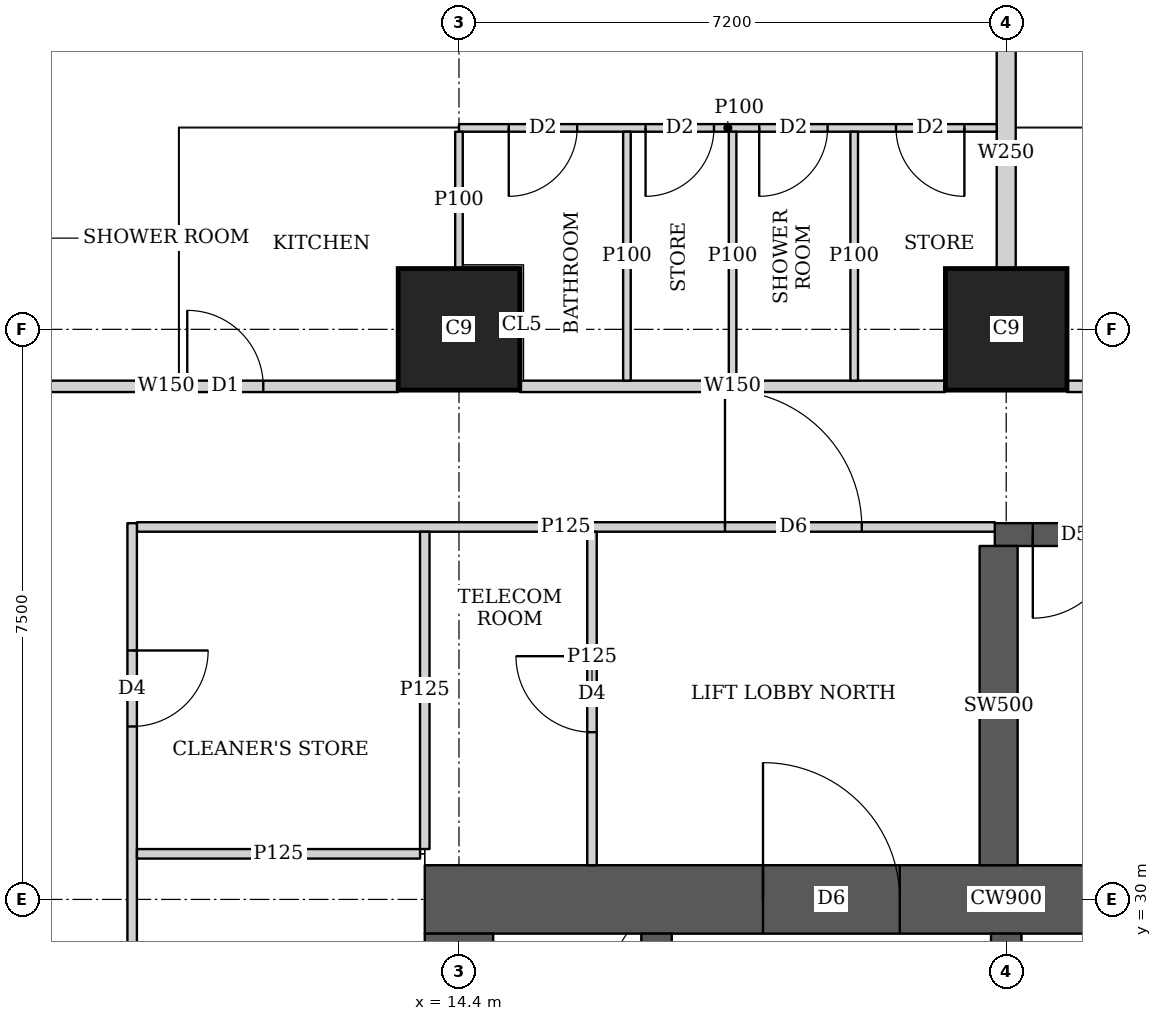
"""IFC4 building model, lengths in metres.
Left out: names, types, materials, properties, quantities, classifications, styles, units other than length and angle.
Written with IfcOpenShell. Run it as: python <this file> out.ifc"""

import sys

from ifc_helpers import new_model, si_unit, direction, frame, frame_2d, origin, origin_2d, place, context, subcontext, project, spatial, rectangle, extrude, element, fill, save


model = new_model("IFC4")
c1 = context("Model", 3, precision=1e-05, world=origin(), true_north=direction((0.0, 1.0)))
c2 = subcontext(c1, "Body", "Model", "MODEL_VIEW")
j1 = project(units=[si_unit("LENGTHUNIT", "METRE"), si_unit("PLANEANGLEUNIT", "RADIAN")], contexts=[c1])
p1 = place(None, origin())
s1 = spatial("IfcSite", under=j1, at=p1, CompositionType="ELEMENT")
p2 = place(p1, origin())
s2 = spatial("IfcBuilding", under=s1, at=p2, CompositionType="ELEMENT")
p3 = place(p2, frame((0.0, 0.0, 126.65)))
s3 = spatial("IfcBuildingStorey", under=s2, at=p3, CompositionType="ELEMENT", Elevation=126.65)
for number, where, z_axis, x_axis in (
    (1, (14.4, 37.5, 0.0), (0.0, 0.0, 1.0), (1.0, 0.0, 0.0)),
    (2, (21.6, 37.5, 0.0), (0.0, 0.0, 1.0), (1.0, 0.0, 0.0)),
):
    element("IfcColumn", number, at=place(p3, frame(where, z_axis=z_axis, x_axis=x_axis)), inside=s3, PredefinedType="COLUMN", context=c2, shape_type="SweptSolid", body=[
        extrude(rectangle(XDim=1.6, YDim=1.6, at=origin_2d()), origin(), (0.0, 0.0, 1.0), 3.75),
    ])
p4 = place(p3, frame((13.95, 30.0, 0.0), z_axis=(0.0, 0.0, 1.0), x_axis=(1.0, 0.0, 0.0)))
e3 = element("IfcWall", 3, at=p4, inside=s3, PredefinedType="SHEAR", context=c2, shape_type="SweptSolid", body=[
    extrude(rectangle(XDim=15.3, YDim=0.9, at=frame_2d((7.65, 0.0))), origin(), (0.0, 0.0, 1.0), 3.75),
])
p5 = place(p4, frame((4.45, 0.0, 0.0)))
e4 = element("IfcOpeningElement", 4, at=p5, cuts=e3, PredefinedType="OPENING", context=c2, shape_type="SweptSolid", body=[
    extrude(rectangle(XDim=1.8, YDim=2.1, at=frame_2d((0.9, 1.05))), frame((0.0, 0.46, 0.0), z_axis=(0.0, -1.0, 0.0), x_axis=(1.0, 0.0, 0.0)), (0.0, 0.0, 1.0), 0.92),
])
p6 = place(p4, frame((10.7, 0.0, 0.0)))
e5 = element("IfcOpeningElement", 5, at=p6, cuts=e3, PredefinedType="OPENING", context=c2, shape_type="SweptSolid", body=[
    extrude(rectangle(XDim=1.1, YDim=2.1, at=frame_2d((0.55, 1.05))), frame((0.0, 0.46, 0.0), z_axis=(0.0, -1.0, 0.0), x_axis=(1.0, 0.0, 0.0)), (0.0, 0.0, 1.0), 0.92),
])
p7 = place(p3, frame((14.4, 15.45, 0.0), z_axis=(0.0, 0.0, 1.0), x_axis=(0.0, 1.0, 0.0)))
e6 = element("IfcWall", 6, at=p7, inside=s3, PredefinedType="SHEAR", context=c2, shape_type="SweptSolid", body=[
    extrude(rectangle(XDim=14.1, YDim=0.9, at=frame_2d((7.05, 0.0))), origin(), (0.0, 0.0, 1.0), 3.75),
])
p8 = place(p3, frame((17.0, 15.45, 0.0), z_axis=(0.0, 0.0, 1.0), x_axis=(0.0, 1.0, 0.0)))
e7 = element("IfcWall", 7, at=p8, inside=s3, PredefinedType="SHEAR", context=c2, shape_type="SweptSolid", body=[
    extrude(rectangle(XDim=14.1, YDim=0.4, at=frame_2d((7.05, 0.0))), origin(), (0.0, 0.0, 1.0), 3.75),
])
p9 = place(p8, frame((0.875, 0.0, 0.0)))
e8 = element("IfcOpeningElement", 8, at=p9, cuts=e7, PredefinedType="OPENING", context=c2, shape_type="SweptSolid", body=[
    extrude(rectangle(XDim=1.1, YDim=2.1, at=frame_2d((0.55, 1.05))), frame((0.0, 0.21, 0.0), z_axis=(0.0, -1.0, 0.0), x_axis=(1.0, 0.0, 0.0)), (0.0, 0.0, 1.0), 0.42),
])
p10 = place(p8, frame((4.625, 0.0, 0.0)))
e9 = element("IfcOpeningElement", 9, at=p10, cuts=e7, PredefinedType="OPENING", context=c2, shape_type="SweptSolid", body=[
    extrude(rectangle(XDim=1.1, YDim=2.1, at=frame_2d((0.55, 1.05))), frame((0.0, 0.21, 0.0), z_axis=(0.0, -1.0, 0.0), x_axis=(1.0, 0.0, 0.0)), (0.0, 0.0, 1.0), 0.42),
])
p11 = place(p8, frame((8.375, 0.0, 0.0)))
e10 = element("IfcOpeningElement", 10, at=p11, cuts=e7, PredefinedType="OPENING", context=c2, shape_type="SweptSolid", body=[
    extrude(rectangle(XDim=1.1, YDim=2.1, at=frame_2d((0.55, 1.05))), frame((0.0, 0.21, 0.0), z_axis=(0.0, -1.0, 0.0), x_axis=(1.0, 0.0, 0.0)), (0.0, 0.0, 1.0), 0.42),
])
p12 = place(p8, frame((12.125, 0.0, 0.0)))
e11 = element("IfcOpeningElement", 11, at=p12, cuts=e7, PredefinedType="OPENING", context=c2, shape_type="SweptSolid", body=[
    extrude(rectangle(XDim=1.1, YDim=2.1, at=frame_2d((0.55, 1.05))), frame((0.0, 0.21, 0.0), z_axis=(0.0, -1.0, 0.0), x_axis=(1.0, 0.0, 0.0)), (0.0, 0.0, 1.0), 0.42),
])
p13 = place(p3, frame((21.6, 15.45, 0.0), z_axis=(0.0, 0.0, 1.0), x_axis=(0.0, 1.0, 0.0)))
e12 = element("IfcWall", 12, at=p13, inside=s3, PredefinedType="SHEAR", context=c2, shape_type="SweptSolid", body=[
    extrude(rectangle(XDim=14.1, YDim=0.4, at=frame_2d((7.05, 0.0))), origin(), (0.0, 0.0, 1.0), 3.75),
])
p14 = place(p3, frame((21.45, 34.8, 0.0), z_axis=(0.0, 0.0, 1.0), x_axis=(1.0, 0.0, 0.0)))
e13 = element("IfcWall", 13, at=p14, inside=s3, PredefinedType="SHEAR", context=c2, shape_type="SweptSolid", body=[
    extrude(rectangle(XDim=7.5, YDim=0.3, at=frame_2d((3.75, 0.0))), origin(), (0.0, 0.0, 1.0), 3.75),
])
p15 = place(p14, frame((0.5, 0.0, 0.0)))
e14 = element("IfcOpeningElement", 14, at=p15, cuts=e13, PredefinedType="OPENING", context=c2, shape_type="SweptSolid", body=[
    extrude(rectangle(XDim=1.1, YDim=2.1, at=frame_2d((0.55, 1.05))), frame((0.0, 0.16, 0.0), z_axis=(0.0, -1.0, 0.0), x_axis=(1.0, 0.0, 0.0)), (0.0, 0.0, 1.0), 0.32),
])
p16 = place(p3, frame((21.5, 30.45, 0.0), z_axis=(0.0, 0.0, 1.0), x_axis=(0.0, 1.0, 0.0)))
e15 = element("IfcWall", 15, at=p16, inside=s3, PredefinedType="SHEAR", context=c2, shape_type="SweptSolid", body=[
    extrude(rectangle(XDim=4.2, YDim=0.5, at=frame_2d((2.1, 0.0))), origin(), (0.0, 0.0, 1.0), 3.75),
])
p17 = place(p3, frame((8.1, 36.75, 0.0), z_axis=(0.0, 0.0, 1.0), x_axis=(1.0, 0.0, 0.0)))
e16 = element("IfcWall", 16, at=p17, inside=s3, PredefinedType="SOLIDWALL", context=c2, shape_type="SweptSolid", body=[
    extrude(rectangle(XDim=5.499, YDim=0.15, at=frame_2d((2.75, 0.0))), origin(), (0.0, 0.0, 1.0), 3.45),
])
p18 = place(p17, frame((2.725, 0.0, 0.0)))
e17 = element("IfcOpeningElement", 17, at=p18, cuts=e16, PredefinedType="OPENING", context=c2, shape_type="SweptSolid", body=[
    extrude(rectangle(XDim=1.0, YDim=2.1, at=frame_2d((0.5, 1.05))), frame((0.0, 0.085, 0.0), z_axis=(0.0, -1.0, 0.0), x_axis=(1.0, 0.0, 0.0)), (0.0, 0.0, 1.0), 0.17),
])
p19 = place(p3, frame((15.201, 36.75, 0.0), z_axis=(0.0, 0.0, 1.0), x_axis=(1.0, 0.0, 0.0)))
e18 = element("IfcWall", 18, at=p19, inside=s3, PredefinedType="SOLIDWALL", context=c2, shape_type="SweptSolid", body=[
    extrude(rectangle(XDim=5.598, YDim=0.15, at=frame_2d((2.799, 0.0))), origin(), (0.0, 0.0, 1.0), 3.45),
])
p20 = place(p3, frame((22.401, 36.75, 0.0), z_axis=(0.0, 0.0, 1.0), x_axis=(1.0, 0.0, 0.0)))
e19 = element("IfcWall", 19, at=p20, inside=s3, PredefinedType="SOLIDWALL", context=c2, shape_type="SweptSolid", body=[
    extrude(rectangle(XDim=5.598, YDim=0.15, at=frame_2d((2.799, 0.0))), origin(), (0.0, 0.0, 1.0), 3.45),
])
p21 = place(p20, frame((0.699, 0.0, 0.0)))
e20 = element("IfcOpeningElement", 20, at=p21, cuts=e19, PredefinedType="OPENING", context=c2, shape_type="SweptSolid", body=[
    extrude(rectangle(XDim=1.0, YDim=2.1, at=frame_2d((0.5, 1.05))), frame((0.0, 0.085, 0.0), z_axis=(0.0, -1.0, 0.0), x_axis=(1.0, 0.0, 0.0)), (0.0, 0.0, 1.0), 0.17),
])
p22 = place(p3, frame((14.4, 40.15, 0.0), z_axis=(0.0, 0.0, 1.0), x_axis=(1.0, 0.0, 0.0)))
e21 = element("IfcWall", 21, at=p22, inside=s3, PredefinedType="PARTITIONING", context=c2, shape_type="SweptSolid", body=[
    extrude(rectangle(XDim=7.075, YDim=0.1, at=frame_2d((3.538, 0.0))), origin(), (0.0, 0.0, 1.0), 3.45),
])
p23 = place(p22, frame((0.655, 0.0, 0.0)))
e22 = element("IfcOpeningElement", 22, at=p23, cuts=e21, PredefinedType="OPENING", context=c2, shape_type="SweptSolid", body=[
    extrude(rectangle(XDim=0.9, YDim=2.1, at=frame_2d((0.45, 1.05))), frame((0.0, 0.06, 0.0), z_axis=(0.0, -1.0, 0.0), x_axis=(1.0, 0.0, 0.0)), (0.0, 0.0, 1.0), 0.12),
])
p24 = place(p22, frame((3.95, 0.0, 0.0)))
e23 = element("IfcOpeningElement", 23, at=p24, cuts=e21, PredefinedType="OPENING", context=c2, shape_type="SweptSolid", body=[
    extrude(rectangle(XDim=0.9, YDim=2.1, at=frame_2d((0.45, 1.05))), frame((0.0, 0.06, 0.0), z_axis=(0.0, -1.0, 0.0), x_axis=(1.0, 0.0, 0.0)), (0.0, 0.0, 1.0), 0.12),
])
p25 = place(p22, frame((2.455, 0.0, 0.0)))
e24 = element("IfcOpeningElement", 24, at=p25, cuts=e21, PredefinedType="OPENING", context=c2, shape_type="SweptSolid", body=[
    extrude(rectangle(XDim=0.9, YDim=2.1, at=frame_2d((0.45, 1.05))), frame((0.0, 0.06, 0.0), z_axis=(0.0, -1.0, 0.0), x_axis=(1.0, 0.0, 0.0)), (0.0, 0.0, 1.0), 0.12),
])
p26 = place(p22, frame((5.75, 0.0, 0.0)))
e25 = element("IfcOpeningElement", 25, at=p26, cuts=e21, PredefinedType="OPENING", context=c2, shape_type="SweptSolid", body=[
    extrude(rectangle(XDim=0.9, YDim=2.1, at=frame_2d((0.45, 1.05))), frame((0.0, 0.06, 0.0), z_axis=(0.0, -1.0, 0.0), x_axis=(1.0, 0.0, 0.0)), (0.0, 0.0, 1.0), 0.12),
])
p27 = place(p3, frame((14.4, 38.301, 0.0), z_axis=(0.0, 0.0, 1.0), x_axis=(0.0, 1.0, 0.0)))
e26 = element("IfcWall", 26, at=p27, inside=s3, PredefinedType="PARTITIONING", context=c2, shape_type="SweptSolid", body=[
    extrude(rectangle(XDim=1.799, YDim=0.1, at=frame_2d((0.899, 0.0))), origin(), (0.0, 0.0, 1.0), 3.45),
])
for number, where, z_axis, x_axis in (
    (27, (18.0, 36.825, 0.0), (0.0, 0.0, 1.0), (0.0, 1.0, 0.0)),
    (28, (16.61, 36.825, 0.0), (0.0, 0.0, 1.0), (0.0, 1.0, 0.0)),
    (29, (19.6, 36.825, 0.0), (0.0, 0.0, 1.0), (0.0, 1.0, 0.0)),
):
    element("IfcWall", number, at=place(p3, frame(where, z_axis=z_axis, x_axis=x_axis)), inside=s3, PredefinedType="PARTITIONING", context=c2, shape_type="SweptSolid", body=[
        extrude(rectangle(XDim=3.275, YDim=0.1, at=frame_2d((1.638, 0.0))), origin(), (0.0, 0.0, 1.0), 3.45),
    ])
p28 = place(p3, frame((21.6, 38.301, 0.0), z_axis=(0.0, 0.0, 1.0), x_axis=(0.0, 1.0, 0.0)))
e30 = element("IfcWall", 30, at=p28, inside=s3, PredefinedType="SOLIDWALL", context=c2, shape_type="SweptSolid", body=[
    extrude(rectangle(XDim=3.049, YDim=0.25, at=frame_2d((1.524, 0.0))), origin(), (0.0, 0.0, 1.0), 3.45),
])
p29 = place(p3, frame((10.1, 10.05, 0.0), z_axis=(0.0, 0.0, 1.0), x_axis=(0.0, 1.0, 0.0)))
e31 = element("IfcWall", 31, at=p29, inside=s3, PredefinedType="PARTITIONING", context=c2, shape_type="SweptSolid", body=[
    extrude(rectangle(XDim=24.9, YDim=0.125, at=frame_2d((12.45, 0.0))), origin(), (0.0, 0.0, 1.0), 3.45),
])
p30 = place(p29, frame((1.675, 0.0, 0.0)))
e32 = element("IfcOpeningElement", 32, at=p30, cuts=e31, PredefinedType="OPENING", context=c2, shape_type="SweptSolid", body=[
    extrude(rectangle(XDim=1.0, YDim=2.1, at=frame_2d((0.5, 1.05))), frame((0.0, 0.073, 0.0), z_axis=(0.0, -1.0, 0.0), x_axis=(1.0, 0.0, 0.0)), (0.0, 0.0, 1.0), 0.145),
])
p31 = place(p29, frame((7.9, 0.0, 0.0)))
e33 = element("IfcOpeningElement", 33, at=p31, cuts=e31, PredefinedType="OPENING", context=c2, shape_type="SweptSolid", body=[
    extrude(rectangle(XDim=1.0, YDim=2.1, at=frame_2d((0.5, 1.05))), frame((0.0, 0.073, 0.0), z_axis=(0.0, -1.0, 0.0), x_axis=(1.0, 0.0, 0.0)), (0.0, 0.0, 1.0), 0.145),
])
p32 = place(p29, frame((16.0, 0.0, 0.0)))
e34 = element("IfcOpeningElement", 34, at=p32, cuts=e31, PredefinedType="OPENING", context=c2, shape_type="SweptSolid", body=[
    extrude(rectangle(XDim=1.0, YDim=2.1, at=frame_2d((0.5, 1.05))), frame((0.0, 0.073, 0.0), z_axis=(0.0, -1.0, 0.0), x_axis=(1.0, 0.0, 0.0)), (0.0, 0.0, 1.0), 0.145),
])
p33 = place(p29, frame((22.225, 0.0, 0.0)))
e35 = element("IfcOpeningElement", 35, at=p33, cuts=e31, PredefinedType="OPENING", context=c2, shape_type="SweptSolid", body=[
    extrude(rectangle(XDim=1.0, YDim=2.1, at=frame_2d((0.5, 1.05))), frame((0.0, 0.073, 0.0), z_axis=(0.0, -1.0, 0.0), x_axis=(1.0, 0.0, 0.0)), (0.0, 0.0, 1.0), 0.145),
])
p34 = place(p3, frame((10.163, 30.6, 0.0), z_axis=(0.0, 0.0, 1.0), x_axis=(1.0, 0.0, 0.0)))
e36 = element("IfcWall", 36, at=p34, inside=s3, PredefinedType="PARTITIONING", context=c2, shape_type="SweptSolid", body=[
    extrude(rectangle(XDim=3.725, YDim=0.125, at=frame_2d((1.862, 0.0))), origin(), (0.0, 0.0, 1.0), 3.45),
])
p35 = place(p3, frame((13.95, 30.663, 0.0), z_axis=(0.0, 0.0, 1.0), x_axis=(0.0, 1.0, 0.0)))
e37 = element("IfcWall", 37, at=p35, inside=s3, PredefinedType="PARTITIONING", context=c2, shape_type="SweptSolid", body=[
    extrude(rectangle(XDim=4.174, YDim=0.125, at=frame_2d((2.087, 0.0))), origin(), (0.0, 0.0, 1.0), 3.45),
])
p36 = place(p3, frame((10.163, 34.9, 0.0), z_axis=(0.0, 0.0, 1.0), x_axis=(1.0, 0.0, 0.0)))
e38 = element("IfcWall", 38, at=p36, inside=s3, PredefinedType="PARTITIONING", context=c2, shape_type="SweptSolid", body=[
    extrude(rectangle(XDim=11.287, YDim=0.125, at=frame_2d((5.644, 0.0))), origin(), (0.0, 0.0, 1.0), 3.45),
])
p37 = place(p36, frame((7.737, 0.0, 0.0)))
e39 = element("IfcOpeningElement", 39, at=p37, cuts=e38, PredefinedType="OPENING", context=c2, shape_type="SweptSolid", body=[
    extrude(rectangle(XDim=1.8, YDim=2.1, at=frame_2d((0.9, 1.05))), frame((0.0, 0.073, 0.0), z_axis=(0.0, -1.0, 0.0), x_axis=(1.0, 0.0, 0.0)), (0.0, 0.0, 1.0), 0.145),
])
p38 = place(p3, frame((16.15, 30.45, 0.0), z_axis=(0.0, 0.0, 1.0), x_axis=(0.0, 1.0, 0.0)))
e40 = element("IfcWall", 40, at=p38, inside=s3, PredefinedType="PARTITIONING", context=c2, shape_type="SweptSolid", body=[
    extrude(rectangle(XDim=4.387, YDim=0.125, at=frame_2d((2.193, 0.0))), origin(), (0.0, 0.0, 1.0), 3.45),
])
p39 = place(p38, frame((1.75, 0.0, 0.0)))
e41 = element("IfcOpeningElement", 41, at=p39, cuts=e40, PredefinedType="OPENING", context=c2, shape_type="SweptSolid", body=[
    extrude(rectangle(XDim=1.0, YDim=2.1, at=frame_2d((0.5, 1.05))), frame((0.0, 0.073, 0.0), z_axis=(0.0, -1.0, 0.0), x_axis=(1.0, 0.0, 0.0)), (0.0, 0.0, 1.0), 0.145),
])
p40 = place(p23, origin())
e42 = element("IfcDoor", 42, at=p40, inside=s3, OperationType="SINGLE_SWING_RIGHT", PredefinedType="DOOR", context=c2, shape_type="SweptSolid", body=[
    extrude(rectangle(XDim=0.9, YDim=2.1, at=frame_2d((0.45, 1.05))), frame((0.0, 0.025, 0.0), z_axis=(0.0, -1.0, 0.0), x_axis=(1.0, 0.0, 0.0)), (0.0, 0.0, 1.0), 0.05),
])
fill(e22, e42)
p41 = place(p24, origin())
e43 = element("IfcDoor", 43, at=p41, inside=s3, OperationType="SINGLE_SWING_RIGHT", PredefinedType="DOOR", context=c2, shape_type="SweptSolid", body=[
    extrude(rectangle(XDim=0.9, YDim=2.1, at=frame_2d((0.45, 1.05))), frame((0.0, 0.025, 0.0), z_axis=(0.0, -1.0, 0.0), x_axis=(1.0, 0.0, 0.0)), (0.0, 0.0, 1.0), 0.05),
])
fill(e23, e43)
p42 = place(p25, origin())
e44 = element("IfcDoor", 44, at=p42, inside=s3, OperationType="SINGLE_SWING_RIGHT", PredefinedType="DOOR", context=c2, shape_type="SweptSolid", body=[
    extrude(rectangle(XDim=0.9, YDim=2.1, at=frame_2d((0.45, 1.05))), frame((0.0, 0.025, 0.0), z_axis=(0.0, -1.0, 0.0), x_axis=(1.0, 0.0, 0.0)), (0.0, 0.0, 1.0), 0.05),
])
fill(e24, e44)
p43 = place(p26, origin())
e45 = element("IfcDoor", 45, at=p43, inside=s3, OperationType="SINGLE_SWING_LEFT", PredefinedType="DOOR", context=c2, shape_type="SweptSolid", body=[
    extrude(rectangle(XDim=0.9, YDim=2.1, at=frame_2d((0.45, 1.05))), frame((0.0, 0.025, 0.0), z_axis=(0.0, -1.0, 0.0), x_axis=(1.0, 0.0, 0.0)), (0.0, 0.0, 1.0), 0.05),
])
fill(e25, e45)
p44 = place(p18, origin())
e46 = element("IfcDoor", 46, at=p44, inside=s3, OperationType="SINGLE_SWING_LEFT", PredefinedType="DOOR", context=c2, shape_type="SweptSolid", body=[
    extrude(rectangle(XDim=1.0, YDim=2.1, at=frame_2d((0.5, 1.05))), frame((0.0, 0.025, 0.0), z_axis=(0.0, -1.0, 0.0), x_axis=(1.0, 0.0, 0.0)), (0.0, 0.0, 1.0), 0.05),
])
fill(e17, e46)
p45 = place(p33, origin())
e47 = element("IfcDoor", 47, at=p45, inside=s3, OperationType="SINGLE_SWING_LEFT", PredefinedType="DOOR", context=c2, shape_type="SweptSolid", body=[
    extrude(rectangle(XDim=1.0, YDim=2.1, at=frame_2d((0.5, 1.05))), frame((0.0, 0.025, 0.0), z_axis=(0.0, -1.0, 0.0), x_axis=(1.0, 0.0, 0.0)), (0.0, 0.0, 1.0), 0.05),
])
fill(e35, e47)
p46 = place(p39, origin())
e48 = element("IfcDoor", 48, at=p46, inside=s3, OperationType="SINGLE_SWING_RIGHT", PredefinedType="DOOR", context=c2, shape_type="SweptSolid", body=[
    extrude(rectangle(XDim=1.0, YDim=2.1, at=frame_2d((0.5, 1.05))), frame((0.0, 0.025, 0.0), z_axis=(0.0, -1.0, 0.0), x_axis=(1.0, 0.0, 0.0)), (0.0, 0.0, 1.0), 0.05),
])
fill(e41, e48)
p47 = place(p37, origin())
e49 = element("IfcDoor", 49, at=p47, inside=s3, OperationType="DOUBLE_DOOR_SINGLE_SWING", PredefinedType="DOOR", context=c2, shape_type="SweptSolid", body=[
    extrude(rectangle(XDim=1.8, YDim=2.1, at=frame_2d((0.9, 1.05))), frame((0.0, 0.025, 0.0), z_axis=(0.0, -1.0, 0.0), x_axis=(1.0, 0.0, 0.0)), (0.0, 0.0, 1.0), 0.05),
])
fill(e39, e49)
p48 = place(p5, origin())
e50 = element("IfcDoor", 50, at=p48, inside=s3, OperationType="DOUBLE_DOOR_SINGLE_SWING", PredefinedType="DOOR", context=c2, shape_type="SweptSolid", body=[
    extrude(rectangle(XDim=1.8, YDim=2.1, at=frame_2d((0.9, 1.05))), frame((0.0, 0.025, 0.0), z_axis=(0.0, -1.0, 0.0), x_axis=(1.0, 0.0, 0.0)), (0.0, 0.0, 1.0), 0.05),
])
fill(e4, e50)
p49 = place(p15, origin())
e51 = element("IfcDoor", 51, at=p49, inside=s3, OperationType="SINGLE_SWING_RIGHT", PredefinedType="DOOR", context=c2, shape_type="SweptSolid", body=[
    extrude(rectangle(XDim=1.1, YDim=2.1, at=frame_2d((0.55, 1.05))), frame((0.0, 0.025, 0.0), z_axis=(0.0, -1.0, 0.0), x_axis=(1.0, 0.0, 0.0)), (0.0, 0.0, 1.0), 0.05),
])
fill(e14, e51)
save(model, sys.argv[1])
